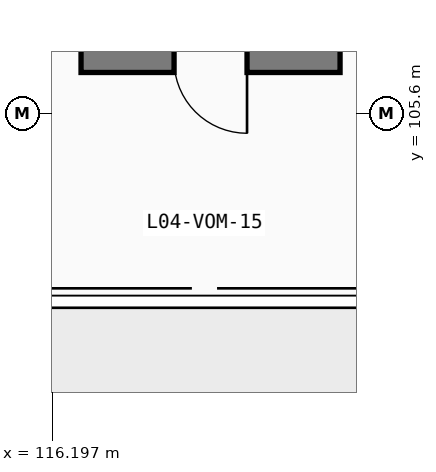
"""IFC4 building model, lengths in metres.
Left out: names, types, materials, properties, quantities, classifications, styles, units other than length and angle.
Written with IfcOpenShell. Run it as: python <this file> out.ifc"""

import sys

from ifc_helpers import new_model, si_unit, direction, frame, frame_2d, origin, place, context, subcontext, project, spatial, rectangle, extrude, element, fill, save


model = new_model("IFC4")
c1 = context("Model", 3, precision=1e-05, world=origin(), true_north=direction((0.0, 1.0)))
c2 = subcontext(c1, "Body", "Model", "MODEL_VIEW")
j1 = project(units=[si_unit("LENGTHUNIT", "METRE"), si_unit("PLANEANGLEUNIT", "RADIAN")], contexts=[c1])
p1 = place(None, origin())
s1 = spatial("IfcSite", under=j1, at=p1, CompositionType="ELEMENT")
p2 = place(p1, origin())
s2 = spatial("IfcBuilding", under=s1, at=p2, CompositionType="ELEMENT")
p3 = place(p2, frame((0.0, 0.0, 18.6)))
s3 = spatial("IfcBuildingStorey", under=s2, at=p3, CompositionType="ELEMENT", Elevation=18.6)
p4 = place(p3, frame((116.67, 106.47, 0.0), z_axis=(0.0, 0.0, 1.0), x_axis=(1.0, 0.0, 0.0)))
e1 = element("IfcWall", 1, at=p4, inside=s3, PredefinedType="SHEAR", context=c2, shape_type="SweptSolid", body=[
    extrude(rectangle(XDim=4.26, YDim=0.4, at=frame_2d((2.13, 0.0))), origin(), (0.0, 0.0, 1.0), 4.24),
])
p5 = place(p4, frame((2.73, 0.0, 0.0), z_axis=(0.0, 0.0, 1.0), x_axis=(-1.0, 0.0, 0.0)))
e2 = element("IfcOpeningElement", 2, at=p5, cuts=e1, PredefinedType="OPENING", context=c2, shape_type="SweptSolid", body=[
    extrude(rectangle(XDim=1.2, YDim=2.2, at=frame_2d((0.6, 1.1))), frame((0.0, 0.21, 0.0), z_axis=(0.0, -1.0, 0.0), x_axis=(1.0, 0.0, 0.0)), (0.0, 0.0, 1.0), 0.42),
])
p6 = place(p5, origin())
e3 = element("IfcDoor", 3, at=p6, inside=s3, OperationType="SINGLE_SWING_LEFT", PredefinedType="DOOR", context=c2, shape_type="SweptSolid", body=[
    extrude(rectangle(XDim=1.2, YDim=2.2, at=frame_2d((0.6, 1.1))), frame((0.0, 0.025, 0.0), z_axis=(0.0, -1.0, 0.0), x_axis=(1.0, 0.0, 0.0)), (0.0, 0.0, 1.0), 0.05),
])
fill(e2, e3)
save(model, sys.argv[1])
